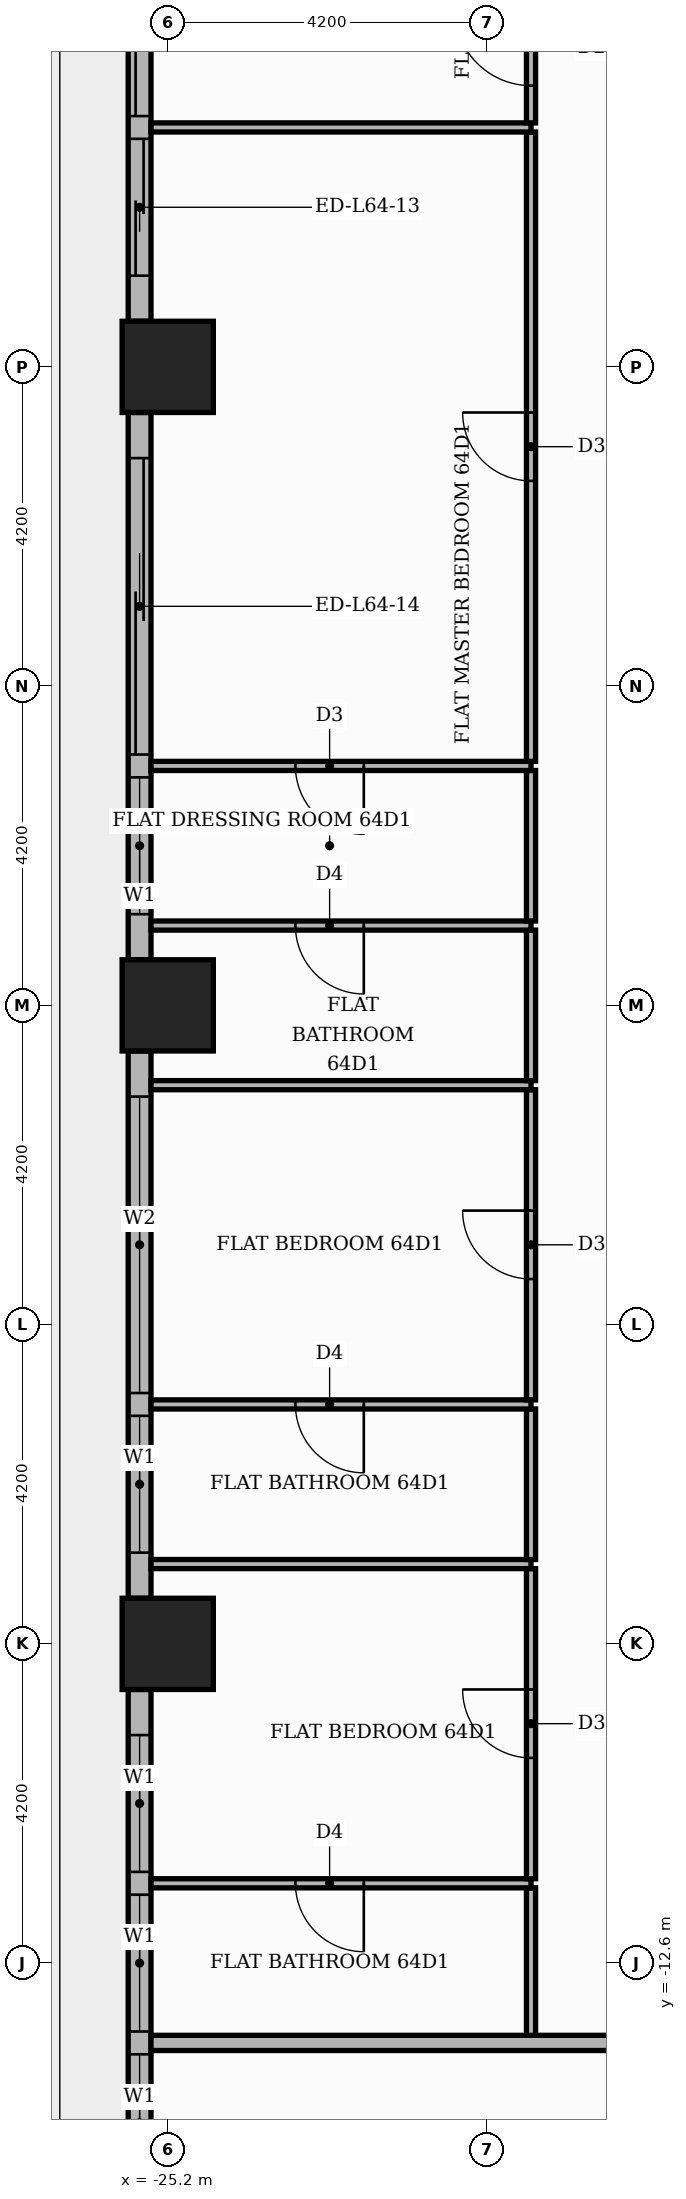
"""IFC4 building model, lengths in metres.
Left out: names, types, materials, properties, quantities, classifications, styles, units other than length and angle.
Written with IfcOpenShell. Run it as: python <this file> out.ifc"""

import sys

from ifc_helpers import new_model, si_unit, direction, frame, frame_2d, origin, origin_2d, place, context, subcontext, project, spatial, rectangle, extrude, element, fill, save


model = new_model("IFC4")
c1 = context("Model", 3, precision=1e-05, world=origin(), true_north=direction((0.0, 1.0)))
c2 = subcontext(c1, "Body", "Model", "MODEL_VIEW")
j1 = project(units=[si_unit("LENGTHUNIT", "METRE"), si_unit("PLANEANGLEUNIT", "RADIAN")], contexts=[c1])
p1 = place(None, origin())
s1 = spatial("IfcSite", under=j1, at=p1, CompositionType="ELEMENT")
p2 = place(p1, origin())
s2 = spatial("IfcBuilding", under=s1, at=p2, CompositionType="ELEMENT")
p3 = place(p2, frame((0.0, 0.0, 267.9)))
s3 = spatial("IfcBuildingStorey", under=s2, at=p3, CompositionType="ELEMENT", Elevation=267.9)
for number, where, z_axis, x_axis in (
    (1, (-25.2, 0.0, 0.0), (0.0, 0.0, 1.0), (1.0, 0.0, 0.0)),
    (2, (-25.2, -8.4, 0.0), (0.0, 0.0, 1.0), (1.0, 0.0, 0.0)),
    (3, (-25.2, 8.4, 0.0), (0.0, 0.0, 1.0), (1.0, 0.0, 0.0)),
):
    element("IfcColumn", number, at=place(p3, frame(where, z_axis=z_axis, x_axis=x_axis)), inside=s3, PredefinedType="COLUMN", context=c2, shape_type="SweptSolid", body=[
        extrude(rectangle(XDim=1.2, YDim=1.2, at=origin_2d()), origin(), (0.0, 0.0, 1.0), 3.9),
    ])
p4 = place(p3, frame((-25.57, 16.2, 0.0), z_axis=(0.0, 0.0, 1.0), x_axis=(0.0, -1.0, 0.0)))
e4 = element("IfcWall", 4, at=p4, inside=s3, PredefinedType="STANDARD", context=c2, shape_type="SweptSolid", body=[
    extrude(rectangle(XDim=7.2, YDim=0.3, at=frame_2d((3.6, 0.0))), origin(), (0.0, 0.0, 1.0), 3.48),
])
p5 = place(p4, frame((0.6, 0.0, 0.0)))
e5 = element("IfcOpeningElement", 5, at=p5, cuts=e4, PredefinedType="OPENING", context=c2, shape_type="SweptSolid", body=[
    extrude(rectangle(XDim=3.9, YDim=2.4, at=frame_2d((1.95, 1.2))), frame((0.0, 0.16, 0.0), z_axis=(0.0, -1.0, 0.0), x_axis=(1.0, 0.0, 0.0)), (0.0, 0.0, 1.0), 0.32),
])
p6 = place(p4, frame((4.8, 0.0, 0.0)))
e6 = element("IfcOpeningElement", 6, at=p6, cuts=e4, PredefinedType="OPENING", context=c2, shape_type="SweptSolid", body=[
    extrude(rectangle(XDim=1.8, YDim=2.4, at=frame_2d((0.9, 1.2))), frame((0.0, 0.16, 0.0), z_axis=(0.0, -1.0, 0.0), x_axis=(1.0, 0.0, 0.0)), (0.0, 0.0, 1.0), 0.32),
])
p7 = place(p3, frame((-25.57, 7.8, 0.0), z_axis=(0.0, 0.0, 1.0), x_axis=(0.0, -1.0, 0.0)))
e7 = element("IfcWall", 7, at=p7, inside=s3, PredefinedType="STANDARD", context=c2, shape_type="SweptSolid", body=[
    extrude(rectangle(XDim=7.2, YDim=0.3, at=frame_2d((3.6, 0.0))), origin(), (0.0, 0.0, 1.0), 3.48),
])
p8 = place(p7, frame((0.6, 0.0, 0.0)))
e8 = element("IfcOpeningElement", 8, at=p8, cuts=e7, PredefinedType="OPENING", context=c2, shape_type="SweptSolid", body=[
    extrude(rectangle(XDim=3.9, YDim=2.4, at=frame_2d((1.95, 1.2))), frame((0.0, 0.16, 0.0), z_axis=(0.0, -1.0, 0.0), x_axis=(1.0, 0.0, 0.0)), (0.0, 0.0, 1.0), 0.32),
])
p9 = place(p7, frame((4.8, 0.0, 0.9)))
e9 = element("IfcOpeningElement", 9, at=p9, cuts=e7, PredefinedType="OPENING", context=c2, shape_type="SweptSolid", body=[
    extrude(rectangle(XDim=1.8, YDim=2.1, at=frame_2d((0.9, 1.05))), frame((0.0, 0.16, 0.0), z_axis=(0.0, -1.0, 0.0), x_axis=(1.0, 0.0, 0.0)), (0.0, 0.0, 1.0), 0.32),
])
p10 = place(p3, frame((-25.57, -0.6, 0.0), z_axis=(0.0, 0.0, 1.0), x_axis=(0.0, -1.0, 0.0)))
e10 = element("IfcWall", 10, at=p10, inside=s3, PredefinedType="STANDARD", context=c2, shape_type="SweptSolid", body=[
    extrude(rectangle(XDim=7.2, YDim=0.3, at=frame_2d((3.6, 0.0))), origin(), (0.0, 0.0, 1.0), 3.48),
])
p11 = place(p10, frame((0.6, 0.0, 0.9)))
e11 = element("IfcOpeningElement", 11, at=p11, cuts=e10, PredefinedType="OPENING", context=c2, shape_type="SweptSolid", body=[
    extrude(rectangle(XDim=3.9, YDim=2.1, at=frame_2d((1.95, 1.05))), frame((0.0, 0.16, 0.0), z_axis=(0.0, -1.0, 0.0), x_axis=(1.0, 0.0, 0.0)), (0.0, 0.0, 1.0), 0.32),
])
p12 = place(p10, frame((4.8, 0.0, 0.9)))
e12 = element("IfcOpeningElement", 12, at=p12, cuts=e10, PredefinedType="OPENING", context=c2, shape_type="SweptSolid", body=[
    extrude(rectangle(XDim=1.8, YDim=2.1, at=frame_2d((0.9, 1.05))), frame((0.0, 0.16, 0.0), z_axis=(0.0, -1.0, 0.0), x_axis=(1.0, 0.0, 0.0)), (0.0, 0.0, 1.0), 0.32),
])
p13 = place(p3, frame((-25.57, -9.0, 0.0), z_axis=(0.0, 0.0, 1.0), x_axis=(0.0, -1.0, 0.0)))
e13 = element("IfcWall", 13, at=p13, inside=s3, PredefinedType="STANDARD", context=c2, shape_type="SweptSolid", body=[
    extrude(rectangle(XDim=7.2, YDim=0.3, at=frame_2d((3.6, 0.0))), origin(), (0.0, 0.0, 1.0), 3.48),
])
p14 = place(p13, frame((0.6, 0.0, 0.9)))
e14 = element("IfcOpeningElement", 14, at=p14, cuts=e13, PredefinedType="OPENING", context=c2, shape_type="SweptSolid", body=[
    extrude(rectangle(XDim=1.8, YDim=2.1, at=frame_2d((0.9, 1.05))), frame((0.0, 0.16, 0.0), z_axis=(0.0, -1.0, 0.0), x_axis=(1.0, 0.0, 0.0)), (0.0, 0.0, 1.0), 0.32),
])
p15 = place(p13, frame((2.7, 0.0, 0.9)))
e15 = element("IfcOpeningElement", 15, at=p15, cuts=e13, PredefinedType="OPENING", context=c2, shape_type="SweptSolid", body=[
    extrude(rectangle(XDim=1.8, YDim=2.1, at=frame_2d((0.9, 1.05))), frame((0.0, 0.16, 0.0), z_axis=(0.0, -1.0, 0.0), x_axis=(1.0, 0.0, 0.0)), (0.0, 0.0, 1.0), 0.32),
])
p16 = place(p13, frame((4.8, 0.0, 0.9)))
e16 = element("IfcOpeningElement", 16, at=p16, cuts=e13, PredefinedType="OPENING", context=c2, shape_type="SweptSolid", body=[
    extrude(rectangle(XDim=1.8, YDim=2.1, at=frame_2d((0.9, 1.05))), frame((0.0, 0.16, 0.0), z_axis=(0.0, -1.0, 0.0), x_axis=(1.0, 0.0, 0.0)), (0.0, 0.0, 1.0), 0.32),
])
p17 = place(p3, frame((-25.42, -13.65, 0.0), z_axis=(0.0, 0.0, 1.0), x_axis=(1.0, 0.0, 0.0)))
e17 = element("IfcWall", 17, at=p17, inside=s3, PredefinedType="PARTITIONING", context=c2, shape_type="SweptSolid", body=[
    extrude(rectangle(XDim=39.07, YDim=0.2, at=frame_2d((19.535, 0.0))), origin(), (0.0, 0.0, 1.0), 3.48),
])
p18 = place(p17, frame((14.37, 0.0, 0.0)))
e18 = element("IfcOpeningElement", 18, at=p18, cuts=e17, PredefinedType="OPENING", context=c2, shape_type="SweptSolid", body=[
    extrude(rectangle(XDim=1.1, YDim=2.4, at=frame_2d((0.55, 1.2))), frame((0.0, 0.11, 0.0), z_axis=(0.0, -1.0, 0.0), x_axis=(1.0, 0.0, 0.0)), (0.0, 0.0, 1.0), 0.22),
])
p19 = place(p3, frame((-20.42, -13.55, 0.0), z_axis=(0.0, 0.0, 1.0), x_axis=(0.0, 1.0, 0.0)))
e19 = element("IfcWall", 19, at=p19, inside=s3, PredefinedType="PARTITIONING", context=c2, shape_type="SweptSolid", body=[
    extrude(rectangle(XDim=1.94, YDim=0.12, at=frame_2d((0.97, 0.0))), origin(), (0.0, 0.0, 1.0), 3.48),
])
p20 = place(p3, frame((-25.42, -11.55, 0.0), z_axis=(0.0, 0.0, 1.0), x_axis=(1.0, 0.0, 0.0)))
e20 = element("IfcWall", 20, at=p20, inside=s3, PredefinedType="PARTITIONING", context=c2, shape_type="SweptSolid", body=[
    extrude(rectangle(XDim=5.0, YDim=0.12, at=frame_2d((2.5, 0.0))), origin(), (0.0, 0.0, 1.0), 3.48),
])
p21 = place(p20, frame((1.9, 0.0, 0.0)))
e21 = element("IfcOpeningElement", 21, at=p21, cuts=e20, PredefinedType="OPENING", context=c2, shape_type="SweptSolid", body=[
    extrude(rectangle(XDim=0.9, YDim=2.1, at=frame_2d((0.45, 1.05))), frame((0.0, 0.07, 0.0), z_axis=(0.0, -1.0, 0.0), x_axis=(1.0, 0.0, 0.0)), (0.0, 0.0, 1.0), 0.14),
])
p22 = place(p3, frame((-20.42, -11.49, 0.0), z_axis=(0.0, 0.0, 1.0), x_axis=(0.0, 1.0, 0.0)))
e22 = element("IfcWall", 22, at=p22, inside=s3, PredefinedType="PARTITIONING", context=c2, shape_type="SweptSolid", body=[
    extrude(rectangle(XDim=4.08, YDim=0.12, at=frame_2d((2.04, 0.0))), origin(), (0.0, 0.0, 1.0), 3.48),
])
p23 = place(p22, frame((1.59, 0.0, 0.0)))
e23 = element("IfcOpeningElement", 23, at=p23, cuts=e22, PredefinedType="OPENING", context=c2, shape_type="SweptSolid", body=[
    extrude(rectangle(XDim=0.9, YDim=2.1, at=frame_2d((0.45, 1.05))), frame((0.0, 0.07, 0.0), z_axis=(0.0, -1.0, 0.0), x_axis=(1.0, 0.0, 0.0)), (0.0, 0.0, 1.0), 0.14),
])
p24 = place(p3, frame((-25.42, -7.35, 0.0), z_axis=(0.0, 0.0, 1.0), x_axis=(1.0, 0.0, 0.0)))
e24 = element("IfcWall", 24, at=p24, inside=s3, PredefinedType="PARTITIONING", context=c2, shape_type="SweptSolid", body=[
    extrude(rectangle(XDim=5.0, YDim=0.12, at=frame_2d((2.5, 0.0))), origin(), (0.0, 0.0, 1.0), 3.48),
])
p25 = place(p3, frame((-20.42, -7.29, 0.0), z_axis=(0.0, 0.0, 1.0), x_axis=(0.0, 1.0, 0.0)))
e25 = element("IfcWall", 25, at=p25, inside=s3, PredefinedType="PARTITIONING", context=c2, shape_type="SweptSolid", body=[
    extrude(rectangle(XDim=1.98, YDim=0.12, at=frame_2d((0.99, 0.0))), origin(), (0.0, 0.0, 1.0), 3.48),
])
p26 = place(p3, frame((-25.42, -5.25, 0.0), z_axis=(0.0, 0.0, 1.0), x_axis=(1.0, 0.0, 0.0)))
e26 = element("IfcWall", 26, at=p26, inside=s3, PredefinedType="PARTITIONING", context=c2, shape_type="SweptSolid", body=[
    extrude(rectangle(XDim=5.0, YDim=0.12, at=frame_2d((2.5, 0.0))), origin(), (0.0, 0.0, 1.0), 3.48),
])
p27 = place(p26, frame((1.9, 0.0, 0.0)))
e27 = element("IfcOpeningElement", 27, at=p27, cuts=e26, PredefinedType="OPENING", context=c2, shape_type="SweptSolid", body=[
    extrude(rectangle(XDim=0.9, YDim=2.1, at=frame_2d((0.45, 1.05))), frame((0.0, 0.07, 0.0), z_axis=(0.0, -1.0, 0.0), x_axis=(1.0, 0.0, 0.0)), (0.0, 0.0, 1.0), 0.14),
])
p28 = place(p3, frame((-20.42, -5.19, 0.0), z_axis=(0.0, 0.0, 1.0), x_axis=(0.0, 1.0, 0.0)))
e28 = element("IfcWall", 28, at=p28, inside=s3, PredefinedType="PARTITIONING", context=c2, shape_type="SweptSolid", body=[
    extrude(rectangle(XDim=4.08, YDim=0.12, at=frame_2d((2.04, 0.0))), origin(), (0.0, 0.0, 1.0), 3.48),
])
p29 = place(p28, frame((1.59, 0.0, 0.0)))
e29 = element("IfcOpeningElement", 29, at=p29, cuts=e28, PredefinedType="OPENING", context=c2, shape_type="SweptSolid", body=[
    extrude(rectangle(XDim=0.9, YDim=2.1, at=frame_2d((0.45, 1.05))), frame((0.0, 0.07, 0.0), z_axis=(0.0, -1.0, 0.0), x_axis=(1.0, 0.0, 0.0)), (0.0, 0.0, 1.0), 0.14),
])
p30 = place(p3, frame((-25.42, -1.05, 0.0), z_axis=(0.0, 0.0, 1.0), x_axis=(1.0, 0.0, 0.0)))
e30 = element("IfcWall", 30, at=p30, inside=s3, PredefinedType="PARTITIONING", context=c2, shape_type="SweptSolid", body=[
    extrude(rectangle(XDim=5.0, YDim=0.12, at=frame_2d((2.5, 0.0))), origin(), (0.0, 0.0, 1.0), 3.48),
])
p31 = place(p3, frame((-20.42, -0.99, 0.0), z_axis=(0.0, 0.0, 1.0), x_axis=(0.0, 1.0, 0.0)))
e31 = element("IfcWall", 31, at=p31, inside=s3, PredefinedType="PARTITIONING", context=c2, shape_type="SweptSolid", body=[
    extrude(rectangle(XDim=1.98, YDim=0.12, at=frame_2d((0.99, 0.0))), origin(), (0.0, 0.0, 1.0), 3.48),
])
p32 = place(p3, frame((-25.42, 1.05, 0.0), z_axis=(0.0, 0.0, 1.0), x_axis=(1.0, 0.0, 0.0)))
e32 = element("IfcWall", 32, at=p32, inside=s3, PredefinedType="PARTITIONING", context=c2, shape_type="SweptSolid", body=[
    extrude(rectangle(XDim=5.0, YDim=0.12, at=frame_2d((2.5, 0.0))), origin(), (0.0, 0.0, 1.0), 3.48),
])
p33 = place(p32, frame((1.9, 0.0, 0.0)))
e33 = element("IfcOpeningElement", 33, at=p33, cuts=e32, PredefinedType="OPENING", context=c2, shape_type="SweptSolid", body=[
    extrude(rectangle(XDim=0.9, YDim=2.1, at=frame_2d((0.45, 1.05))), frame((0.0, 0.07, 0.0), z_axis=(0.0, -1.0, 0.0), x_axis=(1.0, 0.0, 0.0)), (0.0, 0.0, 1.0), 0.14),
])
p34 = place(p3, frame((-20.42, 1.11, 0.0), z_axis=(0.0, 0.0, 1.0), x_axis=(0.0, 1.0, 0.0)))
e34 = element("IfcWall", 34, at=p34, inside=s3, PredefinedType="PARTITIONING", context=c2, shape_type="SweptSolid", body=[
    extrude(rectangle(XDim=1.98, YDim=0.12, at=frame_2d((0.99, 0.0))), origin(), (0.0, 0.0, 1.0), 3.48),
])
p35 = place(p3, frame((-25.42, 3.15, 0.0), z_axis=(0.0, 0.0, 1.0), x_axis=(1.0, 0.0, 0.0)))
e35 = element("IfcWall", 35, at=p35, inside=s3, PredefinedType="PARTITIONING", context=c2, shape_type="SweptSolid", body=[
    extrude(rectangle(XDim=5.0, YDim=0.12, at=frame_2d((2.5, 0.0))), origin(), (0.0, 0.0, 1.0), 3.48),
])
p36 = place(p35, frame((1.9, 0.0, 0.0)))
e36 = element("IfcOpeningElement", 36, at=p36, cuts=e35, PredefinedType="OPENING", context=c2, shape_type="SweptSolid", body=[
    extrude(rectangle(XDim=0.9, YDim=2.1, at=frame_2d((0.45, 1.05))), frame((0.0, 0.07, 0.0), z_axis=(0.0, -1.0, 0.0), x_axis=(1.0, 0.0, 0.0)), (0.0, 0.0, 1.0), 0.14),
])
p37 = place(p3, frame((-20.42, 3.21, 0.0), z_axis=(0.0, 0.0, 1.0), x_axis=(0.0, 1.0, 0.0)))
e37 = element("IfcWall", 37, at=p37, inside=s3, PredefinedType="PARTITIONING", context=c2, shape_type="SweptSolid", body=[
    extrude(rectangle(XDim=8.28, YDim=0.12, at=frame_2d((4.14, 0.0))), origin(), (0.0, 0.0, 1.0), 3.48),
])
p38 = place(p37, frame((3.69, 0.0, 0.0)))
e38 = element("IfcOpeningElement", 38, at=p38, cuts=e37, PredefinedType="OPENING", context=c2, shape_type="SweptSolid", body=[
    extrude(rectangle(XDim=0.9, YDim=2.1, at=frame_2d((0.45, 1.05))), frame((0.0, 0.07, 0.0), z_axis=(0.0, -1.0, 0.0), x_axis=(1.0, 0.0, 0.0)), (0.0, 0.0, 1.0), 0.14),
])
p39 = place(p3, frame((-25.42, 11.55, 0.0), z_axis=(0.0, 0.0, 1.0), x_axis=(1.0, 0.0, 0.0)))
e39 = element("IfcWall", 39, at=p39, inside=s3, PredefinedType="PARTITIONING", context=c2, shape_type="SweptSolid", body=[
    extrude(rectangle(XDim=5.0, YDim=0.12, at=frame_2d((2.5, 0.0))), origin(), (0.0, 0.0, 1.0), 3.48),
])
p40 = place(p3, frame((-20.42, 11.61, 0.0), z_axis=(0.0, 0.0, 1.0), x_axis=(0.0, 1.0, 0.0)))
e40 = element("IfcWall", 40, at=p40, inside=s3, PredefinedType="PARTITIONING", context=c2, shape_type="SweptSolid", body=[
    extrude(rectangle(XDim=1.98, YDim=0.12, at=frame_2d((0.99, 0.0))), origin(), (0.0, 0.0, 1.0), 3.48),
])
p41 = place(p40, frame((0.49, 0.0, 0.0)))
e41 = element("IfcOpeningElement", 41, at=p41, cuts=e40, PredefinedType="OPENING", context=c2, shape_type="SweptSolid", body=[
    extrude(rectangle(XDim=1.0, YDim=2.1, at=frame_2d((0.5, 1.05))), frame((0.0, 0.07, 0.0), z_axis=(0.0, -1.0, 0.0), x_axis=(1.0, 0.0, 0.0)), (0.0, 0.0, 1.0), 0.14),
])
p42 = place(p5, origin())
e42 = element("IfcDoor", 42, at=p42, inside=s3, OperationType="SLIDING_TO_LEFT", PredefinedType="DOOR", context=c2, shape_type="SweptSolid", body=[
    extrude(rectangle(XDim=3.9, YDim=2.4, at=frame_2d((1.95, 1.2))), frame((0.0, 0.025, 0.0), z_axis=(0.0, -1.0, 0.0), x_axis=(1.0, 0.0, 0.0)), (0.0, 0.0, 1.0), 0.05),
])
fill(e5, e42)
p43 = place(p6, origin())
e43 = element("IfcDoor", 43, at=p43, inside=s3, OperationType="SLIDING_TO_RIGHT", PredefinedType="DOOR", context=c2, shape_type="SweptSolid", body=[
    extrude(rectangle(XDim=1.8, YDim=2.4, at=frame_2d((0.9, 1.2))), frame((0.0, 0.025, 0.0), z_axis=(0.0, -1.0, 0.0), x_axis=(1.0, 0.0, 0.0)), (0.0, 0.0, 1.0), 0.05),
])
fill(e6, e43)
p44 = place(p8, origin())
e44 = element("IfcDoor", 44, at=p44, inside=s3, OperationType="SLIDING_TO_LEFT", PredefinedType="DOOR", context=c2, shape_type="SweptSolid", body=[
    extrude(rectangle(XDim=3.9, YDim=2.4, at=frame_2d((1.95, 1.2))), frame((0.0, 0.025, 0.0), z_axis=(0.0, -1.0, 0.0), x_axis=(1.0, 0.0, 0.0)), (0.0, 0.0, 1.0), 0.05),
])
fill(e8, e44)
p45 = place(p9, origin())
e45 = element("IfcWindow", 45, at=p45, inside=s3, PartitioningType="SINGLE_PANEL", PredefinedType="WINDOW", context=c2, shape_type="SweptSolid", body=[
    extrude(rectangle(XDim=1.8, YDim=2.1, at=frame_2d((0.9, 1.05))), frame((0.0, 0.03, 0.0), z_axis=(0.0, -1.0, 0.0), x_axis=(1.0, 0.0, 0.0)), (0.0, 0.0, 1.0), 0.06),
])
fill(e9, e45)
p46 = place(p11, origin())
e46 = element("IfcWindow", 46, at=p46, inside=s3, PartitioningType="SINGLE_PANEL", PredefinedType="WINDOW", context=c2, shape_type="SweptSolid", body=[
    extrude(rectangle(XDim=3.9, YDim=2.1, at=frame_2d((1.95, 1.05))), frame((0.0, 0.03, 0.0), z_axis=(0.0, -1.0, 0.0), x_axis=(1.0, 0.0, 0.0)), (0.0, 0.0, 1.0), 0.06),
])
fill(e11, e46)
p47 = place(p12, origin())
e47 = element("IfcWindow", 47, at=p47, inside=s3, PartitioningType="SINGLE_PANEL", PredefinedType="WINDOW", context=c2, shape_type="SweptSolid", body=[
    extrude(rectangle(XDim=1.8, YDim=2.1, at=frame_2d((0.9, 1.05))), frame((0.0, 0.03, 0.0), z_axis=(0.0, -1.0, 0.0), x_axis=(1.0, 0.0, 0.0)), (0.0, 0.0, 1.0), 0.06),
])
fill(e12, e47)
p48 = place(p14, origin())
e48 = element("IfcWindow", 48, at=p48, inside=s3, PartitioningType="SINGLE_PANEL", PredefinedType="WINDOW", context=c2, shape_type="SweptSolid", body=[
    extrude(rectangle(XDim=1.8, YDim=2.1, at=frame_2d((0.9, 1.05))), frame((0.0, 0.03, 0.0), z_axis=(0.0, -1.0, 0.0), x_axis=(1.0, 0.0, 0.0)), (0.0, 0.0, 1.0), 0.06),
])
fill(e14, e48)
p49 = place(p15, origin())
e49 = element("IfcWindow", 49, at=p49, inside=s3, PartitioningType="SINGLE_PANEL", PredefinedType="WINDOW", context=c2, shape_type="SweptSolid", body=[
    extrude(rectangle(XDim=1.8, YDim=2.1, at=frame_2d((0.9, 1.05))), frame((0.0, 0.03, 0.0), z_axis=(0.0, -1.0, 0.0), x_axis=(1.0, 0.0, 0.0)), (0.0, 0.0, 1.0), 0.06),
])
fill(e15, e49)
p50 = place(p16, origin())
e50 = element("IfcWindow", 50, at=p50, inside=s3, PartitioningType="SINGLE_PANEL", PredefinedType="WINDOW", context=c2, shape_type="SweptSolid", body=[
    extrude(rectangle(XDim=1.8, YDim=2.1, at=frame_2d((0.9, 1.05))), frame((0.0, 0.03, 0.0), z_axis=(0.0, -1.0, 0.0), x_axis=(1.0, 0.0, 0.0)), (0.0, 0.0, 1.0), 0.06),
])
fill(e16, e50)
p51 = place(p41, origin())
e51 = element("IfcDoor", 51, at=p51, inside=s3, OperationType="SINGLE_SWING_RIGHT", PredefinedType="DOOR", context=c2, shape_type="SweptSolid", body=[
    extrude(rectangle(XDim=1.0, YDim=2.1, at=frame_2d((0.5, 1.05))), frame((0.0, 0.025, 0.0), z_axis=(0.0, -1.0, 0.0), x_axis=(1.0, 0.0, 0.0)), (0.0, 0.0, 1.0), 0.05),
])
fill(e41, e51)
p52 = place(p38, origin())
e52 = element("IfcDoor", 52, at=p52, inside=s3, OperationType="SINGLE_SWING_RIGHT", PredefinedType="DOOR", context=c2, shape_type="SweptSolid", body=[
    extrude(rectangle(XDim=0.9, YDim=2.1, at=frame_2d((0.45, 1.05))), frame((0.0, 0.025, 0.0), z_axis=(0.0, -1.0, 0.0), x_axis=(1.0, 0.0, 0.0)), (0.0, 0.0, 1.0), 0.05),
])
fill(e38, e52)
p53 = place(p36, frame((0.9, 0.0, 0.0), z_axis=(0.0, 0.0, 1.0), x_axis=(-1.0, 0.0, 0.0)))
e53 = element("IfcDoor", 53, at=p53, inside=s3, OperationType="SINGLE_SWING_RIGHT", PredefinedType="DOOR", context=c2, shape_type="SweptSolid", body=[
    extrude(rectangle(XDim=0.9, YDim=2.1, at=frame_2d((0.45, 1.05))), frame((0.0, 0.025, 0.0), z_axis=(0.0, -1.0, 0.0), x_axis=(1.0, 0.0, 0.0)), (0.0, 0.0, 1.0), 0.05),
])
fill(e36, e53)
p54 = place(p33, frame((0.9, 0.0, 0.0), z_axis=(0.0, 0.0, 1.0), x_axis=(-1.0, 0.0, 0.0)))
e54 = element("IfcDoor", 54, at=p54, inside=s3, OperationType="SINGLE_SWING_RIGHT", PredefinedType="DOOR", context=c2, shape_type="SweptSolid", body=[
    extrude(rectangle(XDim=0.9, YDim=2.1, at=frame_2d((0.45, 1.05))), frame((0.0, 0.025, 0.0), z_axis=(0.0, -1.0, 0.0), x_axis=(1.0, 0.0, 0.0)), (0.0, 0.0, 1.0), 0.05),
])
fill(e33, e54)
p55 = place(p29, origin())
e55 = element("IfcDoor", 55, at=p55, inside=s3, OperationType="SINGLE_SWING_RIGHT", PredefinedType="DOOR", context=c2, shape_type="SweptSolid", body=[
    extrude(rectangle(XDim=0.9, YDim=2.1, at=frame_2d((0.45, 1.05))), frame((0.0, 0.025, 0.0), z_axis=(0.0, -1.0, 0.0), x_axis=(1.0, 0.0, 0.0)), (0.0, 0.0, 1.0), 0.05),
])
fill(e29, e55)
p56 = place(p27, frame((0.9, 0.0, 0.0), z_axis=(0.0, 0.0, 1.0), x_axis=(-1.0, 0.0, 0.0)))
e56 = element("IfcDoor", 56, at=p56, inside=s3, OperationType="SINGLE_SWING_RIGHT", PredefinedType="DOOR", context=c2, shape_type="SweptSolid", body=[
    extrude(rectangle(XDim=0.9, YDim=2.1, at=frame_2d((0.45, 1.05))), frame((0.0, 0.025, 0.0), z_axis=(0.0, -1.0, 0.0), x_axis=(1.0, 0.0, 0.0)), (0.0, 0.0, 1.0), 0.05),
])
fill(e27, e56)
p57 = place(p23, origin())
e57 = element("IfcDoor", 57, at=p57, inside=s3, OperationType="SINGLE_SWING_RIGHT", PredefinedType="DOOR", context=c2, shape_type="SweptSolid", body=[
    extrude(rectangle(XDim=0.9, YDim=2.1, at=frame_2d((0.45, 1.05))), frame((0.0, 0.025, 0.0), z_axis=(0.0, -1.0, 0.0), x_axis=(1.0, 0.0, 0.0)), (0.0, 0.0, 1.0), 0.05),
])
fill(e23, e57)
p58 = place(p21, frame((0.9, 0.0, 0.0), z_axis=(0.0, 0.0, 1.0), x_axis=(-1.0, 0.0, 0.0)))
e58 = element("IfcDoor", 58, at=p58, inside=s3, OperationType="SINGLE_SWING_RIGHT", PredefinedType="DOOR", context=c2, shape_type="SweptSolid", body=[
    extrude(rectangle(XDim=0.9, YDim=2.1, at=frame_2d((0.45, 1.05))), frame((0.0, 0.025, 0.0), z_axis=(0.0, -1.0, 0.0), x_axis=(1.0, 0.0, 0.0)), (0.0, 0.0, 1.0), 0.05),
])
fill(e21, e58)
save(model, sys.argv[1])
